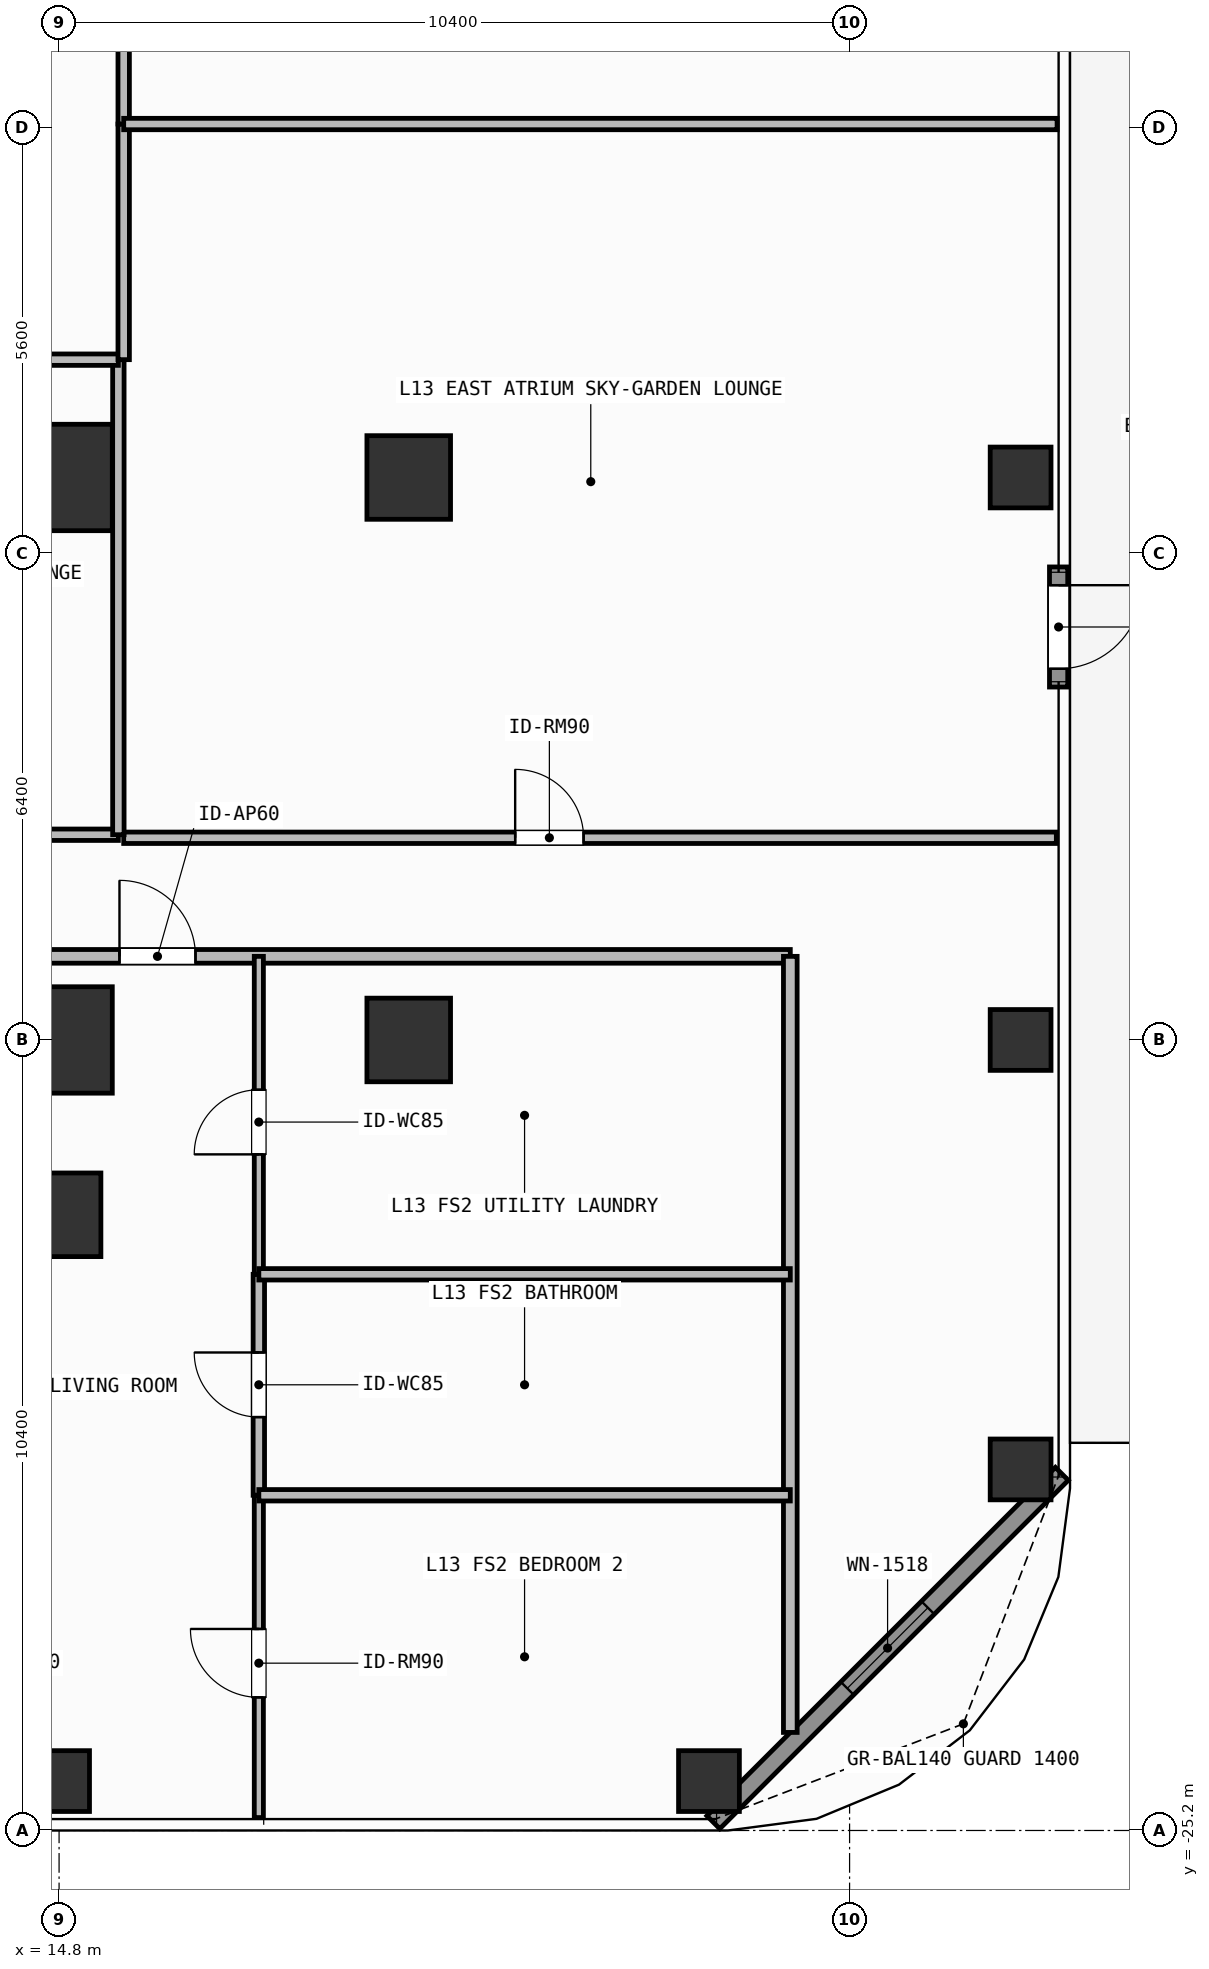
"""IFC4 building model, lengths in metres.
Left out: names, types, materials, properties, quantities, classifications, styles, units other than length and angle.
Written with IfcOpenShell. Run it as: python <this file> out.ifc"""

import sys

from ifc_helpers import new_model, si_unit, direction, frame, frame_2d, origin, origin_2d, place, context, subcontext, project, spatial, rectangle, hollow_rectangle, extrude, element, fill, save


model = new_model("IFC4")
c1 = context("Model", 3, precision=1e-05, world=origin(), true_north=direction((0.0, 1.0)))
c2 = subcontext(c1, "Body", "Model", "MODEL_VIEW")
j1 = project(units=[si_unit("LENGTHUNIT", "METRE"), si_unit("PLANEANGLEUNIT", "RADIAN")], contexts=[c1])
p1 = place(None, origin())
s1 = spatial("IfcSite", under=j1, at=p1, CompositionType="ELEMENT")
p2 = place(p1, origin())
s2 = spatial("IfcBuilding", under=s1, at=p2, CompositionType="ELEMENT")
p3 = place(p2, frame((0.0, 0.0, 50.1)))
s3 = spatial("IfcBuildingStorey", under=s2, at=p3, CompositionType="ELEMENT", Elevation=50.1)
for number, where, z_axis, x_axis in (
    (1, (14.8, -14.8, 0.0), (0.0, 0.0, 1.0), (1.0, 0.0, 0.0)),
    (2, (14.8, -7.4, 0.0), (0.0, 0.0, 1.0), (1.0, 0.0, 0.0)),
):
    element("IfcColumn", number, at=place(p3, frame(where, z_axis=z_axis, x_axis=x_axis)), inside=s3, PredefinedType="COLUMN", context=c2, shape_type="SweptSolid", body=[
        extrude(rectangle(XDim=1.4, YDim=1.4, at=origin_2d()), origin(), (0.0, 0.0, 1.0), 3.9),
    ])
for number, where, z_axis, x_axis in (
    (3, (19.4, -14.8, 0.0), (0.0, 0.0, 1.0), (1.0, 0.0, 0.0)),
    (4, (19.4, -7.4, 0.0), (0.0, 0.0, 1.0), (1.0, 0.0, 0.0)),
    (5, (14.8, -17.1, 0.0), (0.0, 0.0, 1.0), (1.0, 0.0, 0.0)),
):
    element("IfcColumn", number, at=place(p3, frame(where, z_axis=z_axis, x_axis=x_axis)), inside=s3, PredefinedType="COLUMN", context=c2, shape_type="SweptSolid", body=[
        extrude(rectangle(XDim=1.1, YDim=1.1, at=origin_2d()), origin(), (0.0, 0.0, 1.0), 3.9),
    ])
for number, where, z_axis, x_axis in (
    (6, (23.35, -24.55, 0.0), (0.0, 0.0, 1.0), (1.0, 0.0, 0.0)),
    (7, (27.45, -20.45, 0.0), (0.0, 0.0, 1.0), (1.0, 0.0, 0.0)),
    (8, (14.8, -24.55, 0.0), (0.0, 0.0, 1.0), (1.0, 0.0, 0.0)),
    (9, (27.45, -14.8, 0.0), (0.0, 0.0, 1.0), (1.0, 0.0, 0.0)),
    (10, (27.45, -7.4, 0.0), (0.0, 0.0, 1.0), (1.0, 0.0, 0.0)),
):
    element("IfcColumn", number, at=place(p3, frame(where, z_axis=z_axis, x_axis=x_axis)), inside=s3, PredefinedType="COLUMN", context=c2, shape_type="SweptSolid", body=[
        extrude(hollow_rectangle(XDim=0.8, YDim=0.8, WallThickness=0.036, at=origin_2d()), origin(), (0.0, 0.0, 1.0), 3.9),
    ])
p4 = place(p3, frame((27.95, -8.577, 0.0), z_axis=(0.0, 0.0, 1.0), x_axis=(0.0, -1.0, 0.0)))
e11 = element("IfcWall", 11, at=p4, inside=s3, PredefinedType="SOLIDWALL", context=c2, shape_type="SweptSolid", body=[
    extrude(rectangle(XDim=1.58, YDim=0.24, at=frame_2d((0.79, 0.0))), origin(), (0.0, 0.0, 1.0), 3.62),
])
p5 = place(p4, frame((0.24, 0.0, 0.0)))
e12 = element("IfcOpeningElement", 12, at=p5, cuts=e11, PredefinedType="OPENING", context=c2, shape_type="SweptSolid", body=[
    extrude(rectangle(XDim=1.1, YDim=2.2, at=frame_2d((0.55, 1.1))), frame((0.0, 0.13, 0.0), z_axis=(0.0, -1.0, 0.0), x_axis=(1.0, 0.0, 0.0)), (0.0, 0.0, 1.0), 0.26),
])
p6 = place(p3, frame((27.992, -20.508, 0.0), z_axis=(0.0, 0.0, 1.0), x_axis=(-0.707106781187, -0.707106781187, 0.0)))
e13 = element("IfcWall", 13, at=p6, inside=s3, PredefinedType="SOLIDWALL", context=c2, shape_type="SweptSolid", body=[
    extrude(rectangle(XDim=6.484, YDim=0.24, at=frame_2d((3.242, 0.0))), origin(), (0.0, 0.0, 1.0), 3.62),
])
p7 = place(p6, frame((2.492, 0.0, 0.8)))
e14 = element("IfcOpeningElement", 14, at=p7, cuts=e13, PredefinedType="OPENING", context=c2, shape_type="SweptSolid", body=[
    extrude(rectangle(XDim=1.5, YDim=1.85, at=frame_2d((0.75, 0.925))), frame((0.0, 0.13, 0.0), z_axis=(0.0, -1.0, 0.0), x_axis=(1.0, 0.0, 0.0)), (0.0, 0.0, 1.0), 0.26),
])
p8 = place(p3, frame((10.1, -12.1, 0.0), z_axis=(0.0, 0.0, 1.0), x_axis=(1.0, 0.0, 0.0)))
e15 = element("IfcWall", 15, at=p8, inside=s3, PredefinedType="PARTITIONING", context=c2, shape_type="SweptSolid", body=[
    extrude(rectangle(XDim=5.48, YDim=0.15, at=frame_2d((2.74, 0.0))), origin(), (0.0, 0.0, 1.0), 3.62),
])
p9 = place(p8, frame((2.29, 0.0, 0.0)))
e16 = element("IfcOpeningElement", 16, at=p9, cuts=e15, PredefinedType="OPENING", context=c2, shape_type="SweptSolid", body=[
    extrude(rectangle(XDim=0.9, YDim=2.1, at=frame_2d((0.45, 1.05))), frame((0.0, 0.085, 0.0), z_axis=(0.0, -1.0, 0.0), x_axis=(1.0, 0.0, 0.0)), (0.0, 0.0, 1.0), 0.17),
])
p10 = place(p3, frame((6.343, -13.7, 0.0), z_axis=(0.0, 0.0, 1.0), x_axis=(1.0, 0.0, 0.0)))
e17 = element("IfcWall", 17, at=p10, inside=s3, PredefinedType="PARTITIONING", context=c2, shape_type="SweptSolid", body=[
    extrude(rectangle(XDim=18.077, YDim=0.18, at=frame_2d((9.039, 0.0))), origin(), (0.0, 0.0, 1.0), 3.62),
])
p11 = place(p10, frame((9.252, 0.0, 0.0)))
e18 = element("IfcOpeningElement", 18, at=p11, cuts=e17, PredefinedType="OPENING", context=c2, shape_type="SweptSolid", body=[
    extrude(rectangle(XDim=1.0, YDim=2.2, at=frame_2d((0.5, 1.1))), frame((0.0, 0.1, 0.0), z_axis=(0.0, -1.0, 0.0), x_axis=(1.0, 0.0, 0.0)), (0.0, 0.0, 1.0), 0.2),
])
p12 = place(p3, frame((17.428, -20.79, 0.0), z_axis=(0.0, 0.0, 1.0), x_axis=(0.0, 1.0, 0.0)))
e19 = element("IfcWall", 19, at=p12, inside=s3, PredefinedType="PARTITIONING", context=c2, shape_type="SweptSolid", body=[
    extrude(rectangle(XDim=2.907, YDim=0.15, at=frame_2d((1.454, 0.0))), origin(), (0.0, 0.0, 1.0), 3.62),
])
p13 = place(p12, frame((1.029, 0.0, 0.0)))
e20 = element("IfcOpeningElement", 20, at=p13, cuts=e19, PredefinedType="OPENING", context=c2, shape_type="SweptSolid", body=[
    extrude(rectangle(XDim=0.85, YDim=2.1, at=frame_2d((0.425, 1.05))), frame((0.0, 0.085, 0.0), z_axis=(0.0, -1.0, 0.0), x_axis=(1.0, 0.0, 0.0)), (0.0, 0.0, 1.0), 0.17),
])
p14 = place(p3, frame((17.428, -17.883, 0.0), z_axis=(0.0, 0.0, 1.0), x_axis=(0.0, 1.0, 0.0)))
e21 = element("IfcWall", 21, at=p14, inside=s3, PredefinedType="PARTITIONING", context=c2, shape_type="SweptSolid", body=[
    extrude(rectangle(XDim=4.183, YDim=0.12, at=frame_2d((2.092, 0.0))), origin(), (0.0, 0.0, 1.0), 3.62),
])
p15 = place(p14, frame((1.578, 0.0, 0.0)))
e22 = element("IfcOpeningElement", 22, at=p15, cuts=e21, PredefinedType="OPENING", context=c2, shape_type="SweptSolid", body=[
    extrude(rectangle(XDim=0.85, YDim=2.1, at=frame_2d((0.425, 1.05))), frame((0.0, 0.07, 0.0), z_axis=(0.0, -1.0, 0.0), x_axis=(1.0, 0.0, 0.0)), (0.0, 0.0, 1.0), 0.14),
])
p16 = place(p3, frame((17.428, -25.03, 0.0), z_axis=(0.0, 0.0, 1.0), x_axis=(0.0, 1.0, 0.0)))
e23 = element("IfcWall", 23, at=p16, inside=s3, PredefinedType="PARTITIONING", context=c2, shape_type="SweptSolid", body=[
    extrude(rectangle(XDim=4.24, YDim=0.12, at=frame_2d((2.12, 0.0))), origin(), (0.0, 0.0, 1.0), 3.62),
])
p17 = place(p16, frame((1.581, 0.0, 0.0)))
e24 = element("IfcOpeningElement", 24, at=p17, cuts=e23, PredefinedType="OPENING", context=c2, shape_type="SweptSolid", body=[
    extrude(rectangle(XDim=0.9, YDim=2.1, at=frame_2d((0.45, 1.05))), frame((0.0, 0.07, 0.0), z_axis=(0.0, -1.0, 0.0), x_axis=(1.0, 0.0, 0.0)), (0.0, 0.0, 1.0), 0.14),
])
p18 = place(p3, frame((15.65, -12.14, 0.0), z_axis=(0.0, 0.0, 1.0), x_axis=(1.0, 0.0, 0.0)))
e25 = element("IfcWall", 25, at=p18, inside=s3, PredefinedType="PARTITIONING", context=c2, shape_type="SweptSolid", body=[
    extrude(rectangle(XDim=12.27, YDim=0.15, at=frame_2d((6.135, 0.0))), origin(), (0.0, 0.0, 1.0), 3.62),
])
p19 = place(p18, frame((5.15, 0.0, 0.0)))
e26 = element("IfcOpeningElement", 26, at=p19, cuts=e25, PredefinedType="OPENING", context=c2, shape_type="SweptSolid", body=[
    extrude(rectangle(XDim=0.9, YDim=2.1, at=frame_2d((0.45, 1.05))), frame((0.0, 0.085, 0.0), z_axis=(0.0, -1.0, 0.0), x_axis=(1.0, 0.0, 0.0)), (0.0, 0.0, 1.0), 0.17),
])
p20 = place(p3, frame((15.58, -12.1, 0.0), z_axis=(0.0, 0.0, 1.0), x_axis=(0.0, 1.0, 0.0)))
e27 = element("IfcWall", 27, at=p20, inside=s3, PredefinedType="PARTITIONING", context=c2, shape_type="SweptSolid", body=[
    extrude(rectangle(XDim=6.25, YDim=0.15, at=frame_2d((3.125, 0.0))), origin(), (0.0, 0.0, 1.0), 3.62),
])
p21 = place(p3, frame((8.96, -5.85, 0.0), z_axis=(0.0, 0.0, 1.0), x_axis=(1.0, 0.0, 0.0)))
e28 = element("IfcWall", 28, at=p21, inside=s3, PredefinedType="PARTITIONING", context=c2, shape_type="SweptSolid", body=[
    extrude(rectangle(XDim=6.62, YDim=0.15, at=frame_2d((3.31, 0.0))), origin(), (0.0, 0.0, 1.0), 3.62),
])
p22 = place(p3, frame((24.42, -23.91, 0.0), z_axis=(0.0, 0.0, 1.0), x_axis=(0.0, 1.0, 0.0)))
e29 = element("IfcWall", 29, at=p22, inside=s3, PredefinedType="PARTITIONING", context=c2, shape_type="SweptSolid", body=[
    extrude(rectangle(XDim=10.21, YDim=0.18, at=frame_2d((5.105, 0.0))), origin(), (0.0, 0.0, 1.0), 3.62),
])
for number, where, z_axis, x_axis in (
    (30, (17.428, -17.883, 0.0), (0.0, 0.0, 1.0), (1.0, 0.0, 0.0)),
    (31, (17.428, -20.79, 0.0), (0.0, 0.0, 1.0), (1.0, 0.0, 0.0)),
):
    element("IfcWall", number, at=place(p3, frame(where, z_axis=z_axis, x_axis=x_axis)), inside=s3, PredefinedType="PARTITIONING", context=c2, shape_type="SweptSolid", body=[
        extrude(rectangle(XDim=6.992, YDim=0.15, at=frame_2d((3.496, 0.0))), origin(), (0.0, 0.0, 1.0), 3.62),
    ])
p23 = place(p3, frame((15.65, -5.85, 0.0), z_axis=(0.0, 0.0, 1.0), x_axis=(0.0, 1.0, 0.0)))
e32 = element("IfcWall", 32, at=p23, inside=s3, PredefinedType="PARTITIONING", context=c2, shape_type="SweptSolid", body=[
    extrude(rectangle(XDim=3.1, YDim=0.15, at=frame_2d((1.55, 0.0))), origin(), (0.0, 0.0, 1.0), 3.62),
])
p24 = place(p3, frame((15.65, -2.75, 0.0), z_axis=(0.0, 0.0, 1.0), x_axis=(0.0, 1.0, 0.0)))
e33 = element("IfcWall", 33, at=p24, inside=s3, PredefinedType="PARTITIONING", context=c2, shape_type="SweptSolid", body=[
    extrude(rectangle(XDim=8.6, YDim=0.15, at=frame_2d((4.3, 0.0))), origin(), (0.0, 0.0, 1.0), 3.62),
])
p25 = place(p3, frame((15.65, -2.75, 0.0), z_axis=(0.0, 0.0, 1.0), x_axis=(1.0, 0.0, 0.0)))
e34 = element("IfcWall", 34, at=p25, inside=s3, PredefinedType="PARTITIONING", context=c2, shape_type="SweptSolid", body=[
    extrude(rectangle(XDim=12.28, YDim=0.15, at=frame_2d((6.14, 0.0))), origin(), (0.0, 0.0, 1.0), 3.62),
])
p26 = place(p5, origin())
e35 = element("IfcDoor", 35, at=p26, inside=s3, OperationType="SINGLE_SWING_LEFT", PredefinedType="DOOR", context=c2, shape_type="SweptSolid", body=[
    extrude(rectangle(XDim=1.1, YDim=2.2, at=frame_2d((0.55, 1.1))), frame((0.0, 0.025, 0.0), z_axis=(0.0, -1.0, 0.0), x_axis=(1.0, 0.0, 0.0)), (0.0, 0.0, 1.0), 0.05),
])
fill(e12, e35)
p27 = place(p7, origin())
e36 = element("IfcWindow", 36, at=p27, inside=s3, PartitioningType="SINGLE_PANEL", PredefinedType="WINDOW", context=c2, shape_type="SweptSolid", body=[
    extrude(rectangle(XDim=1.5, YDim=1.85, at=frame_2d((0.75, 0.925))), frame((0.0, 0.03, 0.0), z_axis=(0.0, -1.0, 0.0), x_axis=(1.0, 0.0, 0.0)), (0.0, 0.0, 1.0), 0.06),
])
fill(e14, e36)
p28 = place(p11, origin())
e37 = element("IfcDoor", 37, at=p28, inside=s3, OperationType="SINGLE_SWING_LEFT", PredefinedType="DOOR", context=c2, shape_type="SweptSolid", body=[
    extrude(rectangle(XDim=1.0, YDim=2.2, at=frame_2d((0.5, 1.1))), frame((0.0, 0.025, 0.0), z_axis=(0.0, -1.0, 0.0), x_axis=(1.0, 0.0, 0.0)), (0.0, 0.0, 1.0), 0.05),
])
fill(e18, e37)
p29 = place(p13, origin())
e38 = element("IfcDoor", 38, at=p29, inside=s3, OperationType="SINGLE_SWING_RIGHT", PredefinedType="DOOR", context=c2, shape_type="SweptSolid", body=[
    extrude(rectangle(XDim=0.85, YDim=2.1, at=frame_2d((0.425, 1.05))), frame((0.0, 0.025, 0.0), z_axis=(0.0, -1.0, 0.0), x_axis=(1.0, 0.0, 0.0)), (0.0, 0.0, 1.0), 0.05),
])
fill(e20, e38)
p30 = place(p15, origin())
e39 = element("IfcDoor", 39, at=p30, inside=s3, OperationType="SINGLE_SWING_LEFT", PredefinedType="DOOR", context=c2, shape_type="SweptSolid", body=[
    extrude(rectangle(XDim=0.85, YDim=2.1, at=frame_2d((0.425, 1.05))), frame((0.0, 0.025, 0.0), z_axis=(0.0, -1.0, 0.0), x_axis=(1.0, 0.0, 0.0)), (0.0, 0.0, 1.0), 0.05),
])
fill(e22, e39)
p31 = place(p17, origin())
e40 = element("IfcDoor", 40, at=p31, inside=s3, OperationType="SINGLE_SWING_RIGHT", PredefinedType="DOOR", context=c2, shape_type="SweptSolid", body=[
    extrude(rectangle(XDim=0.9, YDim=2.1, at=frame_2d((0.45, 1.05))), frame((0.0, 0.025, 0.0), z_axis=(0.0, -1.0, 0.0), x_axis=(1.0, 0.0, 0.0)), (0.0, 0.0, 1.0), 0.05),
])
fill(e24, e40)
p32 = place(p19, origin())
e41 = element("IfcDoor", 41, at=p32, inside=s3, OperationType="SINGLE_SWING_LEFT", PredefinedType="DOOR", context=c2, shape_type="SweptSolid", body=[
    extrude(rectangle(XDim=0.9, YDim=2.1, at=frame_2d((0.45, 1.05))), frame((0.0, 0.025, 0.0), z_axis=(0.0, -1.0, 0.0), x_axis=(1.0, 0.0, 0.0)), (0.0, 0.0, 1.0), 0.05),
])
fill(e26, e41)
save(model, sys.argv[1])
